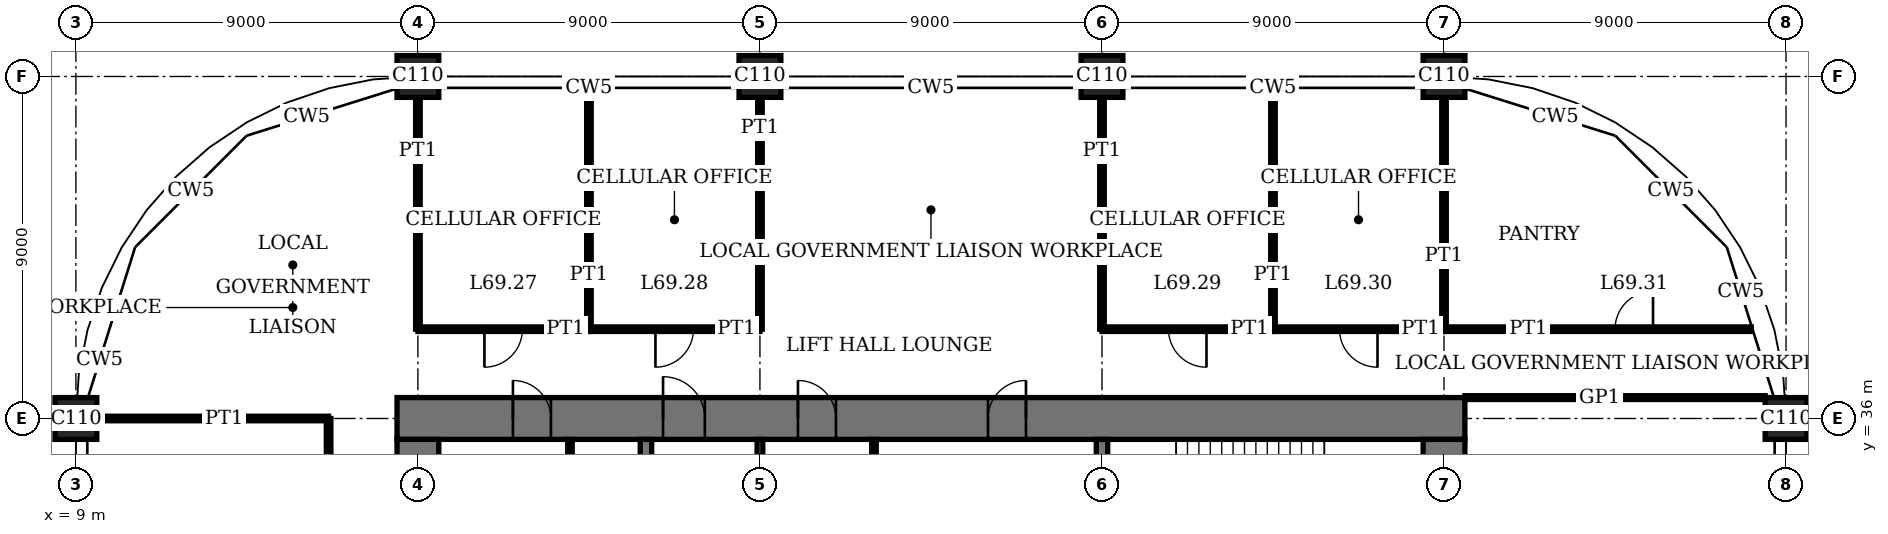
"""IFC4 building model, lengths in metres.
Left out: names, types, materials, properties, quantities, classifications, styles, units other than length and angle.
Written with IfcOpenShell. Run it as: python <this file> out.ifc"""

import sys

from ifc_helpers import new_model, si_unit, direction, frame, frame_2d, origin, origin_2d, place, context, subcontext, project, spatial, rectangle, extrude, element, fill, save


model = new_model("IFC4")
c1 = context("Model", 3, precision=1e-05, world=origin(), true_north=direction((0.0, 1.0)))
c2 = subcontext(c1, "Body", "Model", "MODEL_VIEW")
j1 = project(units=[si_unit("LENGTHUNIT", "METRE"), si_unit("PLANEANGLEUNIT", "RADIAN")], contexts=[c1])
p1 = place(None, origin())
s1 = spatial("IfcSite", under=j1, at=p1, CompositionType="ELEMENT")
p2 = place(p1, origin())
s2 = spatial("IfcBuilding", under=s1, at=p2, CompositionType="ELEMENT")
p3 = place(p2, frame((0.0, 0.0, 283.4)))
s3 = spatial("IfcBuildingStorey", under=s2, at=p3, CompositionType="ELEMENT", Elevation=283.4)
for number, where, z_axis, x_axis in (
    (1, (9.0, 36.0, 0.0), (0.0, 0.0, 1.0), (1.0, 0.0, 0.0)),
    (2, (18.0, 45.0, 0.0), (0.0, 0.0, 1.0), (1.0, 0.0, 0.0)),
    (3, (27.0, 45.0, 0.0), (0.0, 0.0, 1.0), (1.0, 0.0, 0.0)),
    (4, (36.0, 45.0, 0.0), (0.0, 0.0, 1.0), (1.0, 0.0, 0.0)),
    (5, (45.0, 45.0, 0.0), (0.0, 0.0, 1.0), (1.0, 0.0, 0.0)),
    (6, (54.0, 36.0, 0.0), (0.0, 0.0, 1.0), (1.0, 0.0, 0.0)),
):
    element("IfcColumn", number, at=place(p3, frame(where, z_axis=z_axis, x_axis=x_axis)), inside=s3, PredefinedType="COLUMN", context=c2, shape_type="SweptSolid", body=[
        extrude(rectangle(XDim=1.1, YDim=1.1, at=origin_2d()), origin(), (0.0, 0.0, 1.0), 4.0),
    ])
p4 = place(p3, frame((45.55, 36.0, 0.0), z_axis=(0.0, 0.0, 1.0), x_axis=(-1.0, 0.0, 0.0)))
e7 = element("IfcWall", 7, at=p4, inside=s3, PredefinedType="SHEAR", context=c2, shape_type="SweptSolid", body=[
    extrude(rectangle(XDim=28.1, YDim=1.1, at=frame_2d((14.05, 0.0))), origin(), (0.0, 0.0, 1.0), 4.0),
])
p5 = place(p4, frame((11.55, 0.0, 0.0)))
e8 = element("IfcOpeningElement", 8, at=p5, cuts=e7, PredefinedType="OPENING", context=c2, shape_type="SweptSolid", body=[
    extrude(rectangle(XDim=1.0, YDim=2.4, at=frame_2d((0.5, 1.2))), frame((0.0, 0.56, 0.0), z_axis=(0.0, -1.0, 0.0), x_axis=(1.0, 0.0, 0.0)), (0.0, 0.0, 1.0), 1.12),
])
p6 = place(p4, frame((16.55, 0.0, 0.0)))
e9 = element("IfcOpeningElement", 9, at=p6, cuts=e7, PredefinedType="OPENING", context=c2, shape_type="SweptSolid", body=[
    extrude(rectangle(XDim=1.0, YDim=2.4, at=frame_2d((0.5, 1.2))), frame((0.0, 0.56, 0.0), z_axis=(0.0, -1.0, 0.0), x_axis=(1.0, 0.0, 0.0)), (0.0, 0.0, 1.0), 1.12),
])
p7 = place(p4, frame((20.0, 0.0, 0.0)))
e10 = element("IfcOpeningElement", 10, at=p7, cuts=e7, PredefinedType="OPENING", context=c2, shape_type="SweptSolid", body=[
    extrude(rectangle(XDim=1.1, YDim=2.4, at=frame_2d((0.55, 1.2))), frame((0.0, 0.56, 0.0), z_axis=(0.0, -1.0, 0.0), x_axis=(1.0, 0.0, 0.0)), (0.0, 0.0, 1.0), 1.12),
])
p8 = place(p4, frame((24.05, 0.0, 0.0)))
e11 = element("IfcOpeningElement", 11, at=p8, cuts=e7, PredefinedType="OPENING", context=c2, shape_type="SweptSolid", body=[
    extrude(rectangle(XDim=1.0, YDim=2.4, at=frame_2d((0.5, 1.2))), frame((0.0, 0.56, 0.0), z_axis=(0.0, -1.0, 0.0), x_axis=(1.0, 0.0, 0.0)), (0.0, 0.0, 1.0), 1.12),
])
p9 = place(p3, frame((18.0, 35.45, 0.0), z_axis=(0.0, 0.0, 1.0), x_axis=(0.0, -1.0, 0.0)))
e12 = element("IfcWall", 12, at=p9, inside=s3, PredefinedType="SHEAR", context=c2, shape_type="SweptSolid", body=[
    extrude(rectangle(XDim=16.9, YDim=1.1, at=frame_2d((8.45, 0.0))), origin(), (0.0, 0.0, 1.0), 4.0),
])
p10 = place(p9, frame((8.45, 0.0, 0.0)))
e13 = element("IfcOpeningElement", 13, at=p10, cuts=e12, PredefinedType="OPENING", context=c2, shape_type="SweptSolid", body=[
    extrude(rectangle(XDim=1.8, YDim=2.4, at=frame_2d((0.9, 1.2))), frame((0.0, 0.56, 0.0), z_axis=(0.0, -1.0, 0.0), x_axis=(1.0, 0.0, 0.0)), (0.0, 0.0, 1.0), 1.12),
])
p11 = place(p3, frame((45.0, 18.55, 0.0), z_axis=(0.0, 0.0, 1.0), x_axis=(0.0, 1.0, 0.0)))
e14 = element("IfcWall", 14, at=p11, inside=s3, PredefinedType="SHEAR", context=c2, shape_type="SweptSolid", body=[
    extrude(rectangle(XDim=16.9, YDim=1.1, at=frame_2d((8.45, 0.0))), origin(), (0.0, 0.0, 1.0), 4.0),
])
p12 = place(p11, frame((8.45, 0.0, 0.0)))
e15 = element("IfcOpeningElement", 15, at=p12, cuts=e14, PredefinedType="OPENING", context=c2, shape_type="SweptSolid", body=[
    extrude(rectangle(XDim=1.8, YDim=2.4, at=frame_2d((0.9, 1.2))), frame((0.0, 0.56, 0.0), z_axis=(0.0, -1.0, 0.0), x_axis=(1.0, 0.0, 0.0)), (0.0, 0.0, 1.0), 1.12),
])
p13 = place(p3, frame((36.0, 32.4, 0.0), z_axis=(0.0, 0.0, 1.0), x_axis=(0.0, 1.0, 0.0)))
e16 = element("IfcWall", 16, at=p13, inside=s3, PredefinedType="SHEAR", context=c2, shape_type="SweptSolid", body=[
    extrude(rectangle(XDim=3.05, YDim=0.3, at=frame_2d((1.525, 0.0))), origin(), (0.0, 0.0, 1.0), 4.0),
])
p14 = place(p3, frame((24.0, 29.55, 0.0), z_axis=(0.0, 0.0, 1.0), x_axis=(0.0, 1.0, 0.0)))
e17 = element("IfcWall", 17, at=p14, inside=s3, PredefinedType="SHEAR", context=c2, shape_type="SweptSolid", body=[
    extrude(rectangle(XDim=5.9, YDim=0.3, at=frame_2d((2.95, 0.0))), origin(), (0.0, 0.0, 1.0), 4.0),
])
p15 = place(p3, frame((9.55, 36.0, 0.0), z_axis=(0.0, 0.0, 1.0), x_axis=(1.0, 0.0, 0.0)))
e18 = element("IfcWall", 18, at=p15, inside=s3, PredefinedType="PARTITIONING", context=c2, shape_type="SweptSolid", body=[
    extrude(rectangle(XDim=6.1, YDim=0.12, at=frame_2d((3.05, 0.0))), origin(), (0.0, 0.0, 1.0), 3.05),
])
p16 = place(p3, frame((45.55, 36.55, 0.0), z_axis=(0.0, 0.0, 1.0), x_axis=(1.0, 0.0, 0.0)))
e19 = element("IfcWall", 19, at=p16, inside=s3, PredefinedType="PARTITIONING", context=c2, shape_type="SweptSolid", body=[
    extrude(rectangle(XDim=7.9, YDim=0.1, at=frame_2d((3.95, 0.0))), origin(), (0.0, 0.0, 1.0), 3.75),
])
p17 = place(p3, frame((18.0, 38.35, 0.0), z_axis=(0.0, 0.0, 1.0), x_axis=(1.0, 0.0, 0.0)))
e20 = element("IfcWall", 20, at=p17, inside=s3, PredefinedType="PARTITIONING", context=c2, shape_type="SweptSolid", body=[
    extrude(rectangle(XDim=4.5, YDim=0.12, at=frame_2d((2.25, 0.0))), origin(), (0.0, 0.0, 1.0), 3.75),
])
p18 = place(p17, frame((1.75, 0.0, 0.0)))
e21 = element("IfcOpeningElement", 21, at=p18, cuts=e20, PredefinedType="OPENING", context=c2, shape_type="SweptSolid", body=[
    extrude(rectangle(XDim=1.0, YDim=2.4, at=frame_2d((0.5, 1.2))), frame((0.0, 0.07, 0.0), z_axis=(0.0, -1.0, 0.0), x_axis=(1.0, 0.0, 0.0)), (0.0, 0.0, 1.0), 0.14),
])
p19 = place(p3, frame((22.5, 38.35, 0.0), z_axis=(0.0, 0.0, 1.0), x_axis=(1.0, 0.0, 0.0)))
e22 = element("IfcWall", 22, at=p19, inside=s3, PredefinedType="PARTITIONING", context=c2, shape_type="SweptSolid", body=[
    extrude(rectangle(XDim=4.5, YDim=0.12, at=frame_2d((2.25, 0.0))), origin(), (0.0, 0.0, 1.0), 3.75),
])
p20 = place(p19, frame((1.75, 0.0, 0.0)))
e23 = element("IfcOpeningElement", 23, at=p20, cuts=e22, PredefinedType="OPENING", context=c2, shape_type="SweptSolid", body=[
    extrude(rectangle(XDim=1.0, YDim=2.4, at=frame_2d((0.5, 1.2))), frame((0.0, 0.07, 0.0), z_axis=(0.0, -1.0, 0.0), x_axis=(1.0, 0.0, 0.0)), (0.0, 0.0, 1.0), 0.14),
])
p21 = place(p3, frame((36.0, 38.35, 0.0), z_axis=(0.0, 0.0, 1.0), x_axis=(1.0, 0.0, 0.0)))
e24 = element("IfcWall", 24, at=p21, inside=s3, PredefinedType="PARTITIONING", context=c2, shape_type="SweptSolid", body=[
    extrude(rectangle(XDim=4.5, YDim=0.12, at=frame_2d((2.25, 0.0))), origin(), (0.0, 0.0, 1.0), 3.75),
])
p22 = place(p21, frame((1.75, 0.0, 0.0)))
e25 = element("IfcOpeningElement", 25, at=p22, cuts=e24, PredefinedType="OPENING", context=c2, shape_type="SweptSolid", body=[
    extrude(rectangle(XDim=1.0, YDim=2.4, at=frame_2d((0.5, 1.2))), frame((0.0, 0.07, 0.0), z_axis=(0.0, -1.0, 0.0), x_axis=(1.0, 0.0, 0.0)), (0.0, 0.0, 1.0), 0.14),
])
p23 = place(p3, frame((40.5, 38.35, 0.0), z_axis=(0.0, 0.0, 1.0), x_axis=(1.0, 0.0, 0.0)))
e26 = element("IfcWall", 26, at=p23, inside=s3, PredefinedType="PARTITIONING", context=c2, shape_type="SweptSolid", body=[
    extrude(rectangle(XDim=4.5, YDim=0.12, at=frame_2d((2.25, 0.0))), origin(), (0.0, 0.0, 1.0), 3.75),
])
p24 = place(p23, frame((1.75, 0.0, 0.0)))
e27 = element("IfcOpeningElement", 27, at=p24, cuts=e26, PredefinedType="OPENING", context=c2, shape_type="SweptSolid", body=[
    extrude(rectangle(XDim=1.0, YDim=2.4, at=frame_2d((0.5, 1.2))), frame((0.0, 0.07, 0.0), z_axis=(0.0, -1.0, 0.0), x_axis=(1.0, 0.0, 0.0)), (0.0, 0.0, 1.0), 0.14),
])
p25 = place(p3, frame((45.0, 38.35, 0.0), z_axis=(0.0, 0.0, 1.0), x_axis=(1.0, 0.0, 0.0)))
e28 = element("IfcWall", 28, at=p25, inside=s3, PredefinedType="PARTITIONING", context=c2, shape_type="SweptSolid", body=[
    extrude(rectangle(XDim=8.082, YDim=0.12, at=frame_2d((4.041, 0.0))), origin(), (0.0, 0.0, 1.0), 3.75),
])
p26 = place(p25, frame((4.5, 0.0, 0.0)))
e29 = element("IfcOpeningElement", 29, at=p26, cuts=e28, PredefinedType="OPENING", context=c2, shape_type="SweptSolid", body=[
    extrude(rectangle(XDim=1.0, YDim=2.4, at=frame_2d((0.5, 1.2))), frame((0.0, 0.07, 0.0), z_axis=(0.0, -1.0, 0.0), x_axis=(1.0, 0.0, 0.0)), (0.0, 0.0, 1.0), 0.14),
])
p27 = place(p3, frame((15.65, 27.0, 0.0), z_axis=(0.0, 0.0, 1.0), x_axis=(0.0, 1.0, 0.0)))
e30 = element("IfcWall", 30, at=p27, inside=s3, PredefinedType="PARTITIONING", context=c2, shape_type="SweptSolid", body=[
    extrude(rectangle(XDim=9.0, YDim=0.12, at=frame_2d((4.5, 0.0))), origin(), (0.0, 0.0, 1.0), 3.75),
])
p28 = place(p27, frame((4.0, 0.0, 0.0)))
e31 = element("IfcOpeningElement", 31, at=p28, cuts=e30, PredefinedType="OPENING", context=c2, shape_type="SweptSolid", body=[
    extrude(rectangle(XDim=1.0, YDim=2.4, at=frame_2d((0.5, 1.2))), frame((0.0, 0.07, 0.0), z_axis=(0.0, -1.0, 0.0), x_axis=(1.0, 0.0, 0.0)), (0.0, 0.0, 1.0), 0.14),
])
p29 = place(p3, frame((18.0, 38.35, 0.0), z_axis=(0.0, 0.0, 1.0), x_axis=(0.0, 1.0, 0.0)))
e32 = element("IfcWall", 32, at=p29, inside=s3, PredefinedType="PARTITIONING", context=c2, shape_type="SweptSolid", body=[
    extrude(rectangle(XDim=6.1, YDim=0.12, at=frame_2d((3.05, 0.0))), origin(), (0.0, 0.0, 1.0), 3.05),
])
p30 = place(p3, frame((22.5, 38.35, 0.0), z_axis=(0.0, 0.0, 1.0), x_axis=(0.0, 1.0, 0.0)))
e33 = element("IfcWall", 33, at=p30, inside=s3, PredefinedType="PARTITIONING", context=c2, shape_type="SweptSolid", body=[
    extrude(rectangle(XDim=6.34, YDim=0.12, at=frame_2d((3.17, 0.0))), origin(), (0.0, 0.0, 1.0), 3.75),
])
for number, where, z_axis, x_axis in (
    (34, (27.0, 38.35, 0.0), (0.0, 0.0, 1.0), (0.0, 1.0, 0.0)),
    (35, (36.0, 38.35, 0.0), (0.0, 0.0, 1.0), (0.0, 1.0, 0.0)),
):
    element("IfcWall", number, at=place(p3, frame(where, z_axis=z_axis, x_axis=x_axis)), inside=s3, PredefinedType="PARTITIONING", context=c2, shape_type="SweptSolid", body=[
        extrude(rectangle(XDim=6.1, YDim=0.12, at=frame_2d((3.05, 0.0))), origin(), (0.0, 0.0, 1.0), 3.05),
    ])
p31 = place(p3, frame((40.5, 38.35, 0.0), z_axis=(0.0, 0.0, 1.0), x_axis=(0.0, 1.0, 0.0)))
e36 = element("IfcWall", 36, at=p31, inside=s3, PredefinedType="PARTITIONING", context=c2, shape_type="SweptSolid", body=[
    extrude(rectangle(XDim=6.34, YDim=0.12, at=frame_2d((3.17, 0.0))), origin(), (0.0, 0.0, 1.0), 3.75),
])
p32 = place(p3, frame((45.0, 38.35, 0.0), z_axis=(0.0, 0.0, 1.0), x_axis=(0.0, 1.0, 0.0)))
e37 = element("IfcWall", 37, at=p32, inside=s3, PredefinedType="PARTITIONING", context=c2, shape_type="SweptSolid", body=[
    extrude(rectangle(XDim=6.1, YDim=0.12, at=frame_2d((3.05, 0.0))), origin(), (0.0, 0.0, 1.0), 3.05),
])
p33 = place(p3, frame((30.0, 32.55, 0.0), z_axis=(0.0, 0.0, 1.0), x_axis=(0.0, 1.0, 0.0)))
e38 = element("IfcWall", 38, at=p33, inside=s3, PredefinedType="PARTITIONING", context=c2, shape_type="SweptSolid", body=[
    extrude(rectangle(XDim=2.9, YDim=0.12, at=frame_2d((1.45, 0.0))), origin(), (0.0, 0.0, 1.0), 3.75),
])
p34 = place(p3, frame((27.0, 32.55, 0.0), z_axis=(0.0, 0.0, 1.0), x_axis=(0.0, 1.0, 0.0)))
e39 = element("IfcWall", 39, at=p34, inside=s3, PredefinedType="PARTITIONING", context=c2, shape_type="SweptSolid", body=[
    extrude(rectangle(XDim=2.9, YDim=0.15, at=frame_2d((1.45, 0.0))), origin(), (0.0, 0.0, 1.0), 3.75),
])
p35 = place(p3, frame((22.0, 32.55, 0.0), z_axis=(0.0, 0.0, 1.0), x_axis=(0.0, 1.0, 0.0)))
e40 = element("IfcWall", 40, at=p35, inside=s3, PredefinedType="PARTITIONING", context=c2, shape_type="SweptSolid", body=[
    extrude(rectangle(XDim=2.9, YDim=0.12, at=frame_2d((1.45, 0.0))), origin(), (0.0, 0.0, 1.0), 3.75),
])
p36 = place(p35, frame((0.95, 0.0, 0.0)))
e41 = element("IfcOpeningElement", 41, at=p36, cuts=e40, PredefinedType="OPENING", context=c2, shape_type="SweptSolid", body=[
    extrude(rectangle(XDim=1.0, YDim=2.4, at=frame_2d((0.5, 1.2))), frame((0.0, 0.07, 0.0), z_axis=(0.0, -1.0, 0.0), x_axis=(1.0, 0.0, 0.0)), (0.0, 0.0, 1.0), 0.14),
])
p37 = place(p5, origin())
e42 = element("IfcDoor", 42, at=p37, inside=s3, OperationType="SINGLE_SWING_LEFT", PredefinedType="DOOR", context=c2, shape_type="SweptSolid", body=[
    extrude(rectangle(XDim=1.0, YDim=2.4, at=frame_2d((0.5, 1.2))), frame((0.0, 0.025, 0.0), z_axis=(0.0, -1.0, 0.0), x_axis=(1.0, 0.0, 0.0)), (0.0, 0.0, 1.0), 0.05),
    extrude(rectangle(XDim=0.04, YDim=2.4, at=frame_2d((0.02, 1.2))), frame((0.0, 0.4, 0.0), z_axis=(0.0, -1.0, 0.0), x_axis=(1.0, 0.0, 0.0)), (0.0, 0.0, 1.0), 0.8),
    extrude(rectangle(XDim=0.04, YDim=2.4, at=frame_2d((0.98, 1.2))), frame((0.0, 0.4, 0.0), z_axis=(0.0, -1.0, 0.0), x_axis=(1.0, 0.0, 0.0)), (0.0, 0.0, 1.0), 0.8),
    extrude(rectangle(XDim=1.0, YDim=0.04, at=frame_2d((0.5, 2.38))), frame((0.0, 0.4, 0.0), z_axis=(0.0, -1.0, 0.0), x_axis=(1.0, 0.0, 0.0)), (0.0, 0.0, 1.0), 0.8),
])
fill(e8, e42)
p38 = place(p6, origin())
e43 = element("IfcDoor", 43, at=p38, inside=s3, OperationType="SINGLE_SWING_RIGHT", PredefinedType="DOOR", context=c2, shape_type="SweptSolid", body=[
    extrude(rectangle(XDim=1.0, YDim=2.4, at=frame_2d((0.5, 1.2))), frame((0.0, 0.025, 0.0), z_axis=(0.0, -1.0, 0.0), x_axis=(1.0, 0.0, 0.0)), (0.0, 0.0, 1.0), 0.05),
    extrude(rectangle(XDim=0.04, YDim=2.4, at=frame_2d((0.02, 1.2))), frame((0.0, 0.4, 0.0), z_axis=(0.0, -1.0, 0.0), x_axis=(1.0, 0.0, 0.0)), (0.0, 0.0, 1.0), 0.8),
    extrude(rectangle(XDim=0.04, YDim=2.4, at=frame_2d((0.98, 1.2))), frame((0.0, 0.4, 0.0), z_axis=(0.0, -1.0, 0.0), x_axis=(1.0, 0.0, 0.0)), (0.0, 0.0, 1.0), 0.8),
    extrude(rectangle(XDim=1.0, YDim=0.04, at=frame_2d((0.5, 2.38))), frame((0.0, 0.4, 0.0), z_axis=(0.0, -1.0, 0.0), x_axis=(1.0, 0.0, 0.0)), (0.0, 0.0, 1.0), 0.8),
])
fill(e9, e43)
p39 = place(p7, origin())
e44 = element("IfcDoor", 44, at=p39, inside=s3, OperationType="SINGLE_SWING_RIGHT", PredefinedType="DOOR", context=c2, shape_type="SweptSolid", body=[
    extrude(rectangle(XDim=1.1, YDim=2.4, at=frame_2d((0.55, 1.2))), frame((0.0, 0.025, 0.0), z_axis=(0.0, -1.0, 0.0), x_axis=(1.0, 0.0, 0.0)), (0.0, 0.0, 1.0), 0.05),
    extrude(rectangle(XDim=0.04, YDim=2.4, at=frame_2d((0.02, 1.2))), frame((0.0, 0.44, 0.0), z_axis=(0.0, -1.0, 0.0), x_axis=(1.0, 0.0, 0.0)), (0.0, 0.0, 1.0), 0.88),
    extrude(rectangle(XDim=0.04, YDim=2.4, at=frame_2d((1.08, 1.2))), frame((0.0, 0.44, 0.0), z_axis=(0.0, -1.0, 0.0), x_axis=(1.0, 0.0, 0.0)), (0.0, 0.0, 1.0), 0.88),
    extrude(rectangle(XDim=1.1, YDim=0.04, at=frame_2d((0.55, 2.38))), frame((0.0, 0.44, 0.0), z_axis=(0.0, -1.0, 0.0), x_axis=(1.0, 0.0, 0.0)), (0.0, 0.0, 1.0), 0.88),
])
fill(e10, e44)
p40 = place(p8, origin())
e45 = element("IfcDoor", 45, at=p40, inside=s3, OperationType="SINGLE_SWING_RIGHT", PredefinedType="DOOR", context=c2, shape_type="SweptSolid", body=[
    extrude(rectangle(XDim=1.0, YDim=2.4, at=frame_2d((0.5, 1.2))), frame((0.0, 0.025, 0.0), z_axis=(0.0, -1.0, 0.0), x_axis=(1.0, 0.0, 0.0)), (0.0, 0.0, 1.0), 0.05),
    extrude(rectangle(XDim=0.04, YDim=2.4, at=frame_2d((0.02, 1.2))), frame((0.0, 0.4, 0.0), z_axis=(0.0, -1.0, 0.0), x_axis=(1.0, 0.0, 0.0)), (0.0, 0.0, 1.0), 0.8),
    extrude(rectangle(XDim=0.04, YDim=2.4, at=frame_2d((0.98, 1.2))), frame((0.0, 0.4, 0.0), z_axis=(0.0, -1.0, 0.0), x_axis=(1.0, 0.0, 0.0)), (0.0, 0.0, 1.0), 0.8),
    extrude(rectangle(XDim=1.0, YDim=0.04, at=frame_2d((0.5, 2.38))), frame((0.0, 0.4, 0.0), z_axis=(0.0, -1.0, 0.0), x_axis=(1.0, 0.0, 0.0)), (0.0, 0.0, 1.0), 0.8),
])
fill(e11, e45)
p41 = place(p18, origin())
e46 = element("IfcDoor", 46, at=p41, inside=s3, OperationType="SINGLE_SWING_LEFT", PredefinedType="DOOR", context=c2, shape_type="SweptSolid", body=[
    extrude(rectangle(XDim=1.0, YDim=2.4, at=frame_2d((0.5, 1.2))), frame((0.0, 0.025, 0.0), z_axis=(0.0, -1.0, 0.0), x_axis=(1.0, 0.0, 0.0)), (0.0, 0.0, 1.0), 0.05),
])
fill(e21, e46)
p42 = place(p20, origin())
e47 = element("IfcDoor", 47, at=p42, inside=s3, OperationType="SINGLE_SWING_LEFT", PredefinedType="DOOR", context=c2, shape_type="SweptSolid", body=[
    extrude(rectangle(XDim=1.0, YDim=2.4, at=frame_2d((0.5, 1.2))), frame((0.0, 0.025, 0.0), z_axis=(0.0, -1.0, 0.0), x_axis=(1.0, 0.0, 0.0)), (0.0, 0.0, 1.0), 0.05),
])
fill(e23, e47)
p43 = place(p22, origin())
e48 = element("IfcDoor", 48, at=p43, inside=s3, OperationType="SINGLE_SWING_RIGHT", PredefinedType="DOOR", context=c2, shape_type="SweptSolid", body=[
    extrude(rectangle(XDim=1.0, YDim=2.4, at=frame_2d((0.5, 1.2))), frame((0.0, 0.025, 0.0), z_axis=(0.0, -1.0, 0.0), x_axis=(1.0, 0.0, 0.0)), (0.0, 0.0, 1.0), 0.05),
])
fill(e25, e48)
p44 = place(p24, origin())
e49 = element("IfcDoor", 49, at=p44, inside=s3, OperationType="SINGLE_SWING_RIGHT", PredefinedType="DOOR", context=c2, shape_type="SweptSolid", body=[
    extrude(rectangle(XDim=1.0, YDim=2.4, at=frame_2d((0.5, 1.2))), frame((0.0, 0.025, 0.0), z_axis=(0.0, -1.0, 0.0), x_axis=(1.0, 0.0, 0.0)), (0.0, 0.0, 1.0), 0.05),
])
fill(e27, e49)
p45 = place(p26, origin())
e50 = element("IfcDoor", 50, at=p45, inside=s3, OperationType="SINGLE_SWING_LEFT", PredefinedType="DOOR", context=c2, shape_type="SweptSolid", body=[
    extrude(rectangle(XDim=1.0, YDim=2.4, at=frame_2d((0.5, 1.2))), frame((0.0, 0.025, 0.0), z_axis=(0.0, -1.0, 0.0), x_axis=(1.0, 0.0, 0.0)), (0.0, 0.0, 1.0), 0.05),
])
fill(e29, e50)
save(model, sys.argv[1])
